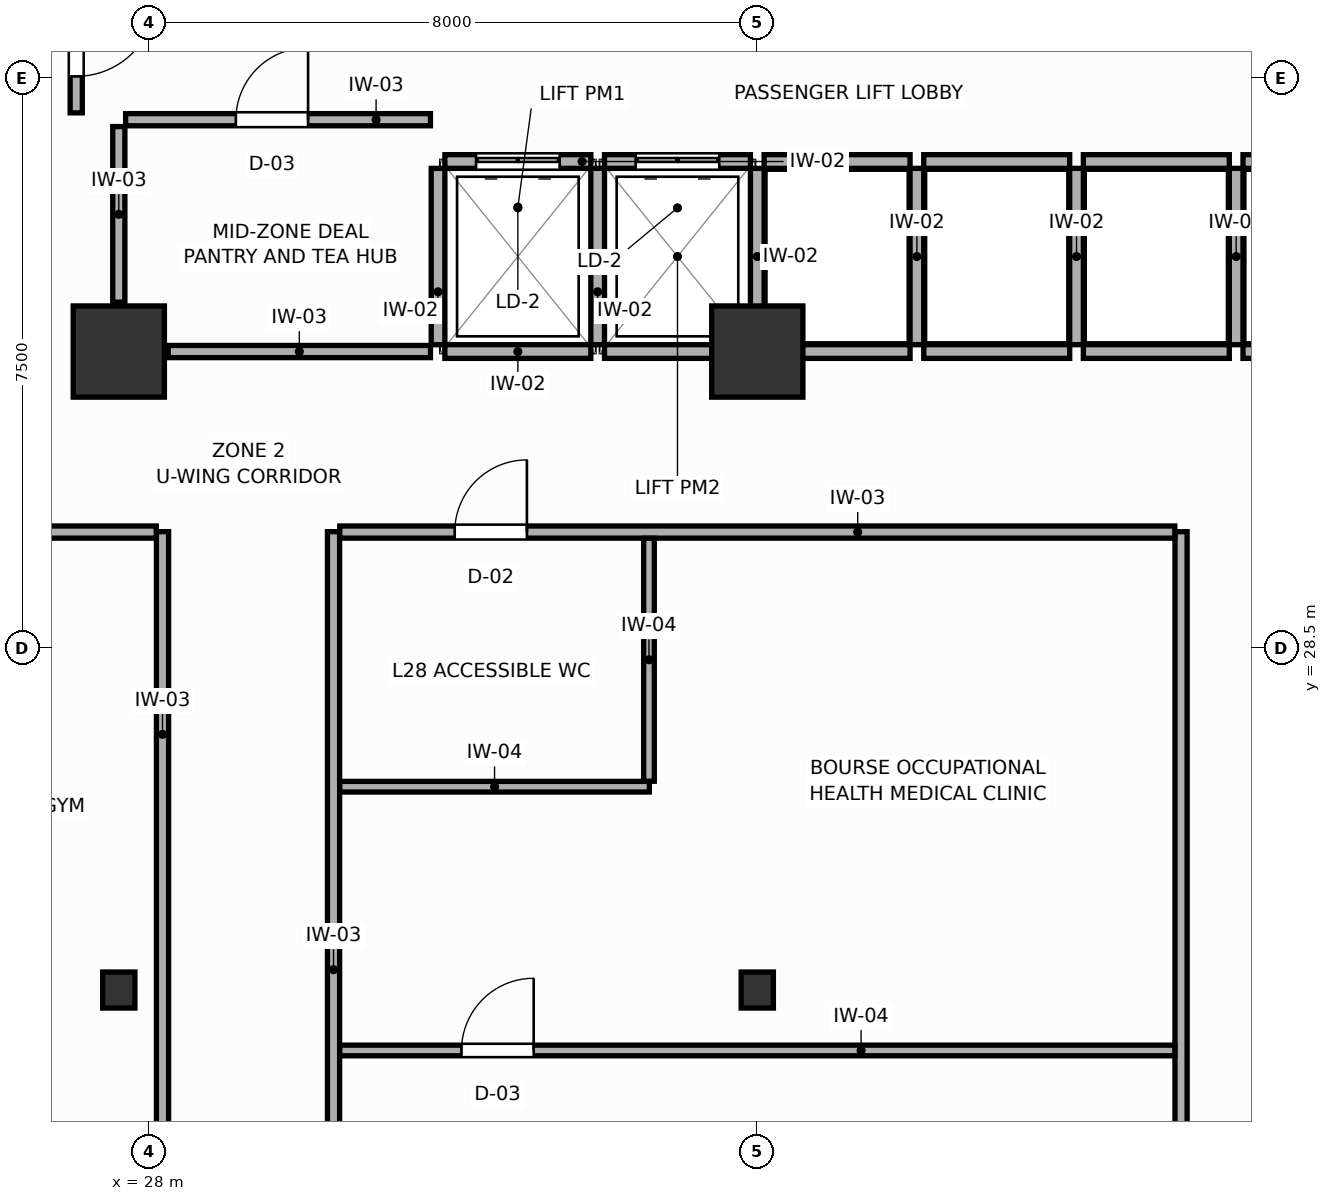
"""IFC4 building model, lengths in metres.
Left out: names, types, materials, properties, quantities, classifications, styles, units other than length and angle.
Written with IfcOpenShell. Run it as: python <this file> out.ifc"""

import sys

from ifc_helpers import new_model, si_unit, direction, frame, frame_2d, origin, origin_2d, place, context, subcontext, project, spatial, rectangle, i_section, extrude, source, transform, mapped, element, fill, save


model = new_model("IFC4")
c1 = context("Model", 3, precision=1e-05, world=origin(), true_north=direction((0.0, 1.0)))
c2 = subcontext(c1, "Body", "Model", "MODEL_VIEW")
j1 = project(units=[si_unit("LENGTHUNIT", "METRE"), si_unit("PLANEANGLEUNIT", "RADIAN")], contexts=[c1])
p1 = place(None, origin())
s1 = spatial("IfcSite", under=j1, at=p1, CompositionType="ELEMENT")
p2 = place(p1, origin())
s2 = spatial("IfcBuilding", under=s1, at=p2, CompositionType="ELEMENT")
p3 = place(p2, frame((0.0, 0.0, 113.4)))
s3 = spatial("IfcBuildingStorey", under=s2, at=p3, CompositionType="ELEMENT", Elevation=113.4)
m1 = source(origin(), c2, "Body", "SweptSolid", [
    extrude(rectangle(XDim=1.2, YDim=1.2, at=origin_2d()), origin(), (0.0, 0.0, 1.0), 3.6),
])
for number, where, z_axis, x_axis in (
    (1, (27.6, 32.4, 0.0), (0.0, 0.0, 1.0), (1.0, 0.0, 0.0)),
    (2, (36.0, 32.4, 0.0), (0.0, 0.0, 1.0), (1.0, 0.0, 0.0)),
):
    element("IfcColumn", number, at=place(p3, frame(where, z_axis=z_axis, x_axis=x_axis)), inside=s3, PredefinedType="COLUMN", context=c2, shape_type="MappedRepresentation", body=[
        mapped(m1, transform((0.0, 0.0, 0.0), scale=1.0)),
    ])
m2 = source(origin(), c2, "Body", "SweptSolid", [
    extrude(i_section(OverallWidth=0.424, OverallDepth=0.474, WebThickness=0.045, FlangeThickness=0.072, FilletRadius=0.015, at=origin_2d()), origin(), (0.0, 0.0, 1.0), 3.6),
])
for number, where, z_axis, x_axis in (
    (3, (27.6, 24.0, 0.0), (0.0, 0.0, 1.0), (1.0, 0.0, 0.0)),
    (4, (36.0, 24.0, 0.0), (0.0, 0.0, 1.0), (1.0, 0.0, 0.0)),
):
    element("IfcColumn", number, at=place(p3, frame(where, z_axis=z_axis, x_axis=x_axis)), inside=s3, PredefinedType="COLUMN", context=c2, shape_type="MappedRepresentation", body=[
        mapped(m2, transform((0.0, 0.0, 0.0), scale=1.0)),
    ])
p4 = place(p3, frame((31.89, 34.9, 0.0), z_axis=(0.0, 0.0, 1.0), x_axis=(1.0, 0.0, 0.0)))
e5 = element("IfcWall", 5, at=p4, inside=s3, PredefinedType="PARTITIONING", context=c2, shape_type="SweptSolid", body=[
    extrude(rectangle(XDim=1.92, YDim=0.18, at=frame_2d((0.96, 0.0))), origin(), (0.0, 0.0, 1.0), 3.4),
])
p5 = place(p4, frame((0.41, 0.0, 0.0)))
e6 = element("IfcOpeningElement", 6, at=p5, cuts=e5, PredefinedType="OPENING", context=c2, shape_type="SweptSolid", body=[
    extrude(rectangle(XDim=1.1, YDim=2.1, at=frame_2d((0.55, 1.05))), frame((0.0, 0.1, 0.0), z_axis=(0.0, -1.0, 0.0), x_axis=(1.0, 0.0, 0.0)), (0.0, 0.0, 1.0), 0.2),
])
p6 = place(p3, frame((31.89, 32.4, 0.0), z_axis=(0.0, 0.0, 1.0), x_axis=(1.0, 0.0, 0.0)))
e7 = element("IfcWall", 7, at=p6, inside=s3, PredefinedType="PARTITIONING", context=c2, shape_type="SweptSolid", body=[
    extrude(rectangle(XDim=1.92, YDim=0.18, at=frame_2d((0.96, 0.0))), origin(), (0.0, 0.0, 1.0), 2.16),
])
p7 = place(p3, frame((31.8, 32.49, 0.0), z_axis=(0.0, 0.0, 1.0), x_axis=(0.0, 1.0, 0.0)))
e8 = element("IfcWall", 8, at=p7, inside=s3, PredefinedType="PARTITIONING", context=c2, shape_type="SweptSolid", body=[
    extrude(rectangle(XDim=2.32, YDim=0.18, at=frame_2d((1.16, 0.0))), origin(), (0.0, 0.0, 1.0), 3.4),
])
p8 = place(p3, frame((33.99, 34.9, 0.0), z_axis=(0.0, 0.0, 1.0), x_axis=(1.0, 0.0, 0.0)))
e9 = element("IfcWall", 9, at=p8, inside=s3, PredefinedType="PARTITIONING", context=c2, shape_type="SweptSolid", body=[
    extrude(rectangle(XDim=1.92, YDim=0.18, at=frame_2d((0.96, 0.0))), origin(), (0.0, 0.0, 1.0), 3.4),
])
p9 = place(p8, frame((0.41, 0.0, 0.0)))
e10 = element("IfcOpeningElement", 10, at=p9, cuts=e9, PredefinedType="OPENING", context=c2, shape_type="SweptSolid", body=[
    extrude(rectangle(XDim=1.1, YDim=2.1, at=frame_2d((0.55, 1.05))), frame((0.0, 0.1, 0.0), z_axis=(0.0, -1.0, 0.0), x_axis=(1.0, 0.0, 0.0)), (0.0, 0.0, 1.0), 0.2),
])
p10 = place(p3, frame((33.99, 32.4, 0.0), z_axis=(0.0, 0.0, 1.0), x_axis=(1.0, 0.0, 0.0)))
e11 = element("IfcWall", 11, at=p10, inside=s3, PredefinedType="PARTITIONING", context=c2, shape_type="SweptSolid", body=[
    extrude(rectangle(XDim=1.92, YDim=0.18, at=frame_2d((0.96, 0.0))), origin(), (0.0, 0.0, 1.0), 2.16),
])
p11 = place(p3, frame((33.9, 32.49, 0.0), z_axis=(0.0, 0.0, 1.0), x_axis=(0.0, 1.0, 0.0)))
e12 = element("IfcWall", 12, at=p11, inside=s3, PredefinedType="PARTITIONING", context=c2, shape_type="SweptSolid", body=[
    extrude(rectangle(XDim=2.32, YDim=0.18, at=frame_2d((1.16, 0.0))), origin(), (0.0, 0.0, 1.0), 3.4),
])
p12 = place(p3, frame((36.09, 34.9, 0.0), z_axis=(0.0, 0.0, 1.0), x_axis=(1.0, 0.0, 0.0)))
e13 = element("IfcWall", 13, at=p12, inside=s3, PredefinedType="PARTITIONING", context=c2, shape_type="SweptSolid", body=[
    extrude(rectangle(XDim=1.92, YDim=0.18, at=frame_2d((0.96, 0.0))), origin(), (0.0, 0.0, 1.0), 3.4),
])
p13 = place(p3, frame((36.09, 32.4, 0.0), z_axis=(0.0, 0.0, 1.0), x_axis=(1.0, 0.0, 0.0)))
e14 = element("IfcWall", 14, at=p13, inside=s3, PredefinedType="PARTITIONING", context=c2, shape_type="SweptSolid", body=[
    extrude(rectangle(XDim=1.92, YDim=0.18, at=frame_2d((0.96, 0.0))), origin(), (0.0, 0.0, 1.0), 2.16),
])
p14 = place(p3, frame((36.0, 32.49, 0.0), z_axis=(0.0, 0.0, 1.0), x_axis=(0.0, 1.0, 0.0)))
e15 = element("IfcWall", 15, at=p14, inside=s3, PredefinedType="PARTITIONING", context=c2, shape_type="SweptSolid", body=[
    extrude(rectangle(XDim=2.32, YDim=0.18, at=frame_2d((1.16, 0.0))), origin(), (0.0, 0.0, 1.0), 3.4),
])
p15 = place(p3, frame((38.19, 34.9, 0.0), z_axis=(0.0, 0.0, 1.0), x_axis=(1.0, 0.0, 0.0)))
e16 = element("IfcWall", 16, at=p15, inside=s3, PredefinedType="PARTITIONING", context=c2, shape_type="SweptSolid", body=[
    extrude(rectangle(XDim=1.92, YDim=0.18, at=frame_2d((0.96, 0.0))), origin(), (0.0, 0.0, 1.0), 3.4),
])
p16 = place(p3, frame((38.19, 32.4, 0.0), z_axis=(0.0, 0.0, 1.0), x_axis=(1.0, 0.0, 0.0)))
e17 = element("IfcWall", 17, at=p16, inside=s3, PredefinedType="PARTITIONING", context=c2, shape_type="SweptSolid", body=[
    extrude(rectangle(XDim=1.92, YDim=0.18, at=frame_2d((0.96, 0.0))), origin(), (0.0, 0.0, 1.0), 2.16),
])
p17 = place(p3, frame((38.1, 32.49, 0.0), z_axis=(0.0, 0.0, 1.0), x_axis=(0.0, 1.0, 0.0)))
e18 = element("IfcWall", 18, at=p17, inside=s3, PredefinedType="PARTITIONING", context=c2, shape_type="SweptSolid", body=[
    extrude(rectangle(XDim=2.32, YDim=0.18, at=frame_2d((1.16, 0.0))), origin(), (0.0, 0.0, 1.0), 3.4),
])
p18 = place(p3, frame((40.29, 34.9, 0.0), z_axis=(0.0, 0.0, 1.0), x_axis=(1.0, 0.0, 0.0)))
e19 = element("IfcWall", 19, at=p18, inside=s3, PredefinedType="PARTITIONING", context=c2, shape_type="SweptSolid", body=[
    extrude(rectangle(XDim=1.92, YDim=0.18, at=frame_2d((0.96, 0.0))), origin(), (0.0, 0.0, 1.0), 3.4),
])
p19 = place(p3, frame((40.29, 32.4, 0.0), z_axis=(0.0, 0.0, 1.0), x_axis=(1.0, 0.0, 0.0)))
e20 = element("IfcWall", 20, at=p19, inside=s3, PredefinedType="PARTITIONING", context=c2, shape_type="SweptSolid", body=[
    extrude(rectangle(XDim=1.92, YDim=0.18, at=frame_2d((0.96, 0.0))), origin(), (0.0, 0.0, 1.0), 2.16),
])
p20 = place(p3, frame((40.2, 32.49, 0.0), z_axis=(0.0, 0.0, 1.0), x_axis=(0.0, 1.0, 0.0)))
e21 = element("IfcWall", 21, at=p20, inside=s3, PredefinedType="PARTITIONING", context=c2, shape_type="SweptSolid", body=[
    extrude(rectangle(XDim=2.32, YDim=0.18, at=frame_2d((1.16, 0.0))), origin(), (0.0, 0.0, 1.0), 3.4),
])
p21 = place(p3, frame((42.39, 34.9, 0.0), z_axis=(0.0, 0.0, 1.0), x_axis=(1.0, 0.0, 0.0)))
e22 = element("IfcWall", 22, at=p21, inside=s3, PredefinedType="PARTITIONING", context=c2, shape_type="SweptSolid", body=[
    extrude(rectangle(XDim=1.92, YDim=0.18, at=frame_2d((0.96, 0.0))), origin(), (0.0, 0.0, 1.0), 3.4),
])
p22 = place(p3, frame((42.39, 32.4, 0.0), z_axis=(0.0, 0.0, 1.0), x_axis=(1.0, 0.0, 0.0)))
e23 = element("IfcWall", 23, at=p22, inside=s3, PredefinedType="PARTITIONING", context=c2, shape_type="SweptSolid", body=[
    extrude(rectangle(XDim=1.92, YDim=0.18, at=frame_2d((0.96, 0.0))), origin(), (0.0, 0.0, 1.0), 2.16),
])
p23 = place(p3, frame((42.3, 32.49, 0.0), z_axis=(0.0, 0.0, 1.0), x_axis=(0.0, 1.0, 0.0)))
e24 = element("IfcWall", 24, at=p23, inside=s3, PredefinedType="PARTITIONING", context=c2, shape_type="SweptSolid", body=[
    extrude(rectangle(XDim=2.32, YDim=0.18, at=frame_2d((1.16, 0.0))), origin(), (0.0, 0.0, 1.0), 3.4),
])
p24 = place(p3, frame((28.25, 32.4, 0.0), z_axis=(0.0, 0.0, 1.0), x_axis=(1.0, 0.0, 0.0)))
e25 = element("IfcWall", 25, at=p24, inside=s3, PredefinedType="PARTITIONING", context=c2, shape_type="SweptSolid", body=[
    extrude(rectangle(XDim=3.45, YDim=0.16, at=frame_2d((1.725, 0.0))), origin(), (0.0, 0.0, 1.0), 2.16),
])
p25 = place(p3, frame((27.6, 33.05, 0.0), z_axis=(0.0, 0.0, 1.0), x_axis=(0.0, 1.0, 0.0)))
e26 = element("IfcWall", 26, at=p25, inside=s3, PredefinedType="PARTITIONING", context=c2, shape_type="SweptSolid", body=[
    extrude(rectangle(XDim=2.31, YDim=0.16, at=frame_2d((1.155, 0.0))), origin(), (0.0, 0.0, 1.0), 3.4),
])
p26 = place(p3, frame((27.69, 35.45, 0.0), z_axis=(0.0, 0.0, 1.0), x_axis=(1.0, 0.0, 0.0)))
e27 = element("IfcWall", 27, at=p26, inside=s3, PredefinedType="PARTITIONING", context=c2, shape_type="SweptSolid", body=[
    extrude(rectangle(XDim=4.01, YDim=0.16, at=frame_2d((2.005, 0.0))), origin(), (0.0, 0.0, 1.0), 3.4),
])
p27 = place(p26, frame((1.45, 0.0, 0.0)))
e28 = element("IfcOpeningElement", 28, at=p27, cuts=e27, PredefinedType="OPENING", context=c2, shape_type="SweptSolid", body=[
    extrude(rectangle(XDim=0.95, YDim=2.05, at=frame_2d((0.475, 1.025))), frame((0.0, 0.09, 0.0), z_axis=(0.0, -1.0, 0.0), x_axis=(1.0, 0.0, 0.0)), (0.0, 0.0, 1.0), 0.18),
])
p28 = place(p3, frame((27.04, 35.54, 0.0), z_axis=(0.0, 0.0, 1.0), x_axis=(0.0, 1.0, 0.0)))
e29 = element("IfcWall", 29, at=p28, inside=s3, PredefinedType="PARTITIONING", context=c2, shape_type="SweptSolid", body=[
    extrude(rectangle(XDim=2.11, YDim=0.16, at=frame_2d((1.055, 0.0))), origin(), (0.0, 0.0, 1.0), 3.4),
])
p29 = place(p28, frame((0.48, 0.0, 0.0)))
e30 = element("IfcOpeningElement", 30, at=p29, cuts=e29, PredefinedType="OPENING", context=c2, shape_type="SweptSolid", body=[
    extrude(rectangle(XDim=1.05, YDim=2.1, at=frame_2d((0.525, 1.05))), frame((0.0, 0.09, 0.0), z_axis=(0.0, -1.0, 0.0), x_axis=(1.0, 0.0, 0.0)), (0.0, 0.0, 1.0), 0.18),
])
p30 = place(p3, frame((30.425, 12.461, 0.0), z_axis=(0.0, 0.0, 1.0), x_axis=(0.0, 1.0, 0.0)))
e31 = element("IfcWall", 31, at=p30, inside=s3, PredefinedType="PARTITIONING", context=c2, shape_type="SweptSolid", body=[
    extrude(rectangle(XDim=17.569, YDim=0.16, at=frame_2d((8.785, 0.0))), origin(), (0.0, 0.0, 1.0), 3.4),
])
p31 = place(p30, frame((4.916, 0.0, 0.0)))
e32 = element("IfcOpeningElement", 32, at=p31, cuts=e31, PredefinedType="OPENING", context=c2, shape_type="SweptSolid", body=[
    extrude(rectangle(XDim=0.95, YDim=2.05, at=frame_2d((0.475, 1.025))), frame((0.0, 0.09, 0.0), z_axis=(0.0, -1.0, 0.0), x_axis=(1.0, 0.0, 0.0)), (0.0, 0.0, 1.0), 0.18),
])
p32 = place(p3, frame((41.575, 12.461, 0.0), z_axis=(0.0, 0.0, 1.0), x_axis=(0.0, 1.0, 0.0)))
e33 = element("IfcWall", 33, at=p32, inside=s3, PredefinedType="PARTITIONING", context=c2, shape_type="SweptSolid", body=[
    extrude(rectangle(XDim=17.569, YDim=0.16, at=frame_2d((8.785, 0.0))), origin(), (0.0, 0.0, 1.0), 3.4),
])
p33 = place(p3, frame((28.175, 15.212, 0.0), z_axis=(0.0, 0.0, 1.0), x_axis=(0.0, 1.0, 0.0)))
e34 = element("IfcWall", 34, at=p33, inside=s3, PredefinedType="PARTITIONING", context=c2, shape_type="SweptSolid", body=[
    extrude(rectangle(XDim=14.818, YDim=0.16, at=frame_2d((7.409, 0.0))), origin(), (0.0, 0.0, 1.0), 3.4),
])
p34 = place(p33, frame((4.801, 0.0, 0.0)))
e35 = element("IfcOpeningElement", 35, at=p34, cuts=e34, PredefinedType="OPENING", context=c2, shape_type="SweptSolid", body=[
    extrude(rectangle(XDim=0.95, YDim=2.05, at=frame_2d((0.475, 1.025))), frame((0.0, 0.09, 0.0), z_axis=(0.0, -1.0, 0.0), x_axis=(1.0, 0.0, 0.0)), (0.0, 0.0, 1.0), 0.18),
])
p35 = place(p3, frame((30.507, 30.025, 0.0), z_axis=(0.0, 0.0, 1.0), x_axis=(1.0, 0.0, 0.0)))
e36 = element("IfcWall", 36, at=p35, inside=s3, PredefinedType="PARTITIONING", context=c2, shape_type="SweptSolid", body=[
    extrude(rectangle(XDim=10.986, YDim=0.16, at=frame_2d((5.493, 0.0))), origin(), (0.0, 0.0, 1.0), 3.4),
])
p36 = place(p35, frame((1.512, 0.0, 0.0)))
e37 = element("IfcOpeningElement", 37, at=p36, cuts=e36, PredefinedType="OPENING", context=c2, shape_type="SweptSolid", body=[
    extrude(rectangle(XDim=0.95, YDim=2.05, at=frame_2d((0.475, 1.025))), frame((0.0, 0.09, 0.0), z_axis=(0.0, -1.0, 0.0), x_axis=(1.0, 0.0, 0.0)), (0.0, 0.0, 1.0), 0.18),
])
p37 = place(p3, frame((18.287, 30.025, 0.0), z_axis=(0.0, 0.0, 1.0), x_axis=(1.0, 0.0, 0.0)))
e38 = element("IfcWall", 38, at=p37, inside=s3, PredefinedType="PARTITIONING", context=c2, shape_type="SweptSolid", body=[
    extrude(rectangle(XDim=9.806, YDim=0.16, at=frame_2d((4.903, 0.0))), origin(), (0.0, 0.0, 1.0), 3.4),
])
p38 = place(p3, frame((30.507, 23.205, 0.0), z_axis=(0.0, 0.0, 1.0), x_axis=(1.0, 0.0, 0.0)))
e39 = element("IfcWall", 39, at=p38, inside=s3, PredefinedType="PARTITIONING", context=c2, shape_type="SweptSolid", body=[
    extrude(rectangle(XDim=10.986, YDim=0.14, at=frame_2d((5.493, 0.0))), origin(), (0.0, 0.0, 1.0), 3.4),
])
p39 = place(p38, frame((1.601, 0.0, 0.0)))
e40 = element("IfcOpeningElement", 40, at=p39, cuts=e39, PredefinedType="OPENING", context=c2, shape_type="SweptSolid", body=[
    extrude(rectangle(XDim=0.95, YDim=2.05, at=frame_2d((0.475, 1.025))), frame((0.0, 0.08, 0.0), z_axis=(0.0, -1.0, 0.0), x_axis=(1.0, 0.0, 0.0)), (0.0, 0.0, 1.0), 0.16),
])
p40 = place(p3, frame((30.507, 26.675, 0.0), z_axis=(0.0, 0.0, 1.0), x_axis=(1.0, 0.0, 0.0)))
e41 = element("IfcWall", 41, at=p40, inside=s3, PredefinedType="PARTITIONING", context=c2, shape_type="SweptSolid", body=[
    extrude(rectangle(XDim=4.073, YDim=0.14, at=frame_2d((2.037, 0.0))), origin(), (0.0, 0.0, 1.0), 3.4),
])
p41 = place(p3, frame((34.575, 26.747, 0.0), z_axis=(0.0, 0.0, 1.0), x_axis=(0.0, 1.0, 0.0)))
e42 = element("IfcWall", 42, at=p41, inside=s3, PredefinedType="PARTITIONING", context=c2, shape_type="SweptSolid", body=[
    extrude(rectangle(XDim=3.196, YDim=0.14, at=frame_2d((1.598, 0.0))), origin(), (0.0, 0.0, 1.0), 3.4),
])
p42 = place(p5, origin())
e43 = element("IfcDoor", 43, at=p42, inside=s3, OperationType="DOUBLE_DOOR_SLIDING", PredefinedType="DOOR", context=c2, shape_type="SweptSolid", body=[
    extrude(rectangle(XDim=1.1, YDim=2.1, at=frame_2d((0.55, 1.05))), frame((0.0, 0.025, 0.0), z_axis=(0.0, -1.0, 0.0), x_axis=(1.0, 0.0, 0.0)), (0.0, 0.0, 1.0), 0.05),
])
fill(e6, e43)
p43 = place(p9, origin())
e44 = element("IfcDoor", 44, at=p43, inside=s3, OperationType="DOUBLE_DOOR_SLIDING", PredefinedType="DOOR", context=c2, shape_type="SweptSolid", body=[
    extrude(rectangle(XDim=1.1, YDim=2.1, at=frame_2d((0.55, 1.05))), frame((0.0, 0.025, 0.0), z_axis=(0.0, -1.0, 0.0), x_axis=(1.0, 0.0, 0.0)), (0.0, 0.0, 1.0), 0.05),
])
fill(e10, e44)
p44 = place(p27, origin())
e45 = element("IfcDoor", 45, at=p44, inside=s3, OperationType="SINGLE_SWING_RIGHT", PredefinedType="DOOR", context=c2, shape_type="SweptSolid", body=[
    extrude(rectangle(XDim=0.95, YDim=2.05, at=frame_2d((0.475, 1.025))), frame((0.0, 0.025, 0.0), z_axis=(0.0, -1.0, 0.0), x_axis=(1.0, 0.0, 0.0)), (0.0, 0.0, 1.0), 0.05),
])
fill(e28, e45)
p45 = place(p29, frame((1.05, 0.0, 0.0), z_axis=(0.0, 0.0, 1.0), x_axis=(-1.0, 0.0, 0.0)))
e46 = element("IfcDoor", 46, at=p45, inside=s3, OperationType="SINGLE_SWING_LEFT", PredefinedType="DOOR", context=c2, shape_type="SweptSolid", body=[
    extrude(rectangle(XDim=1.05, YDim=2.1, at=frame_2d((0.525, 1.05))), frame((0.0, 0.025, 0.0), z_axis=(0.0, -1.0, 0.0), x_axis=(1.0, 0.0, 0.0)), (0.0, 0.0, 1.0), 0.05),
])
fill(e30, e46)
p46 = place(p36, origin())
e47 = element("IfcDoor", 47, at=p46, inside=s3, OperationType="SINGLE_SWING_RIGHT", PredefinedType="DOOR", context=c2, shape_type="SweptSolid", body=[
    extrude(rectangle(XDim=0.95, YDim=2.05, at=frame_2d((0.475, 1.025))), frame((0.0, 0.025, 0.0), z_axis=(0.0, -1.0, 0.0), x_axis=(1.0, 0.0, 0.0)), (0.0, 0.0, 1.0), 0.05),
])
fill(e37, e47)
p47 = place(p39, origin())
e48 = element("IfcDoor", 48, at=p47, inside=s3, OperationType="SINGLE_SWING_RIGHT", PredefinedType="DOOR", context=c2, shape_type="SweptSolid", body=[
    extrude(rectangle(XDim=0.95, YDim=2.05, at=frame_2d((0.475, 1.025))), frame((0.0, 0.025, 0.0), z_axis=(0.0, -1.0, 0.0), x_axis=(1.0, 0.0, 0.0)), (0.0, 0.0, 1.0), 0.05),
])
fill(e40, e48)
save(model, sys.argv[1])
